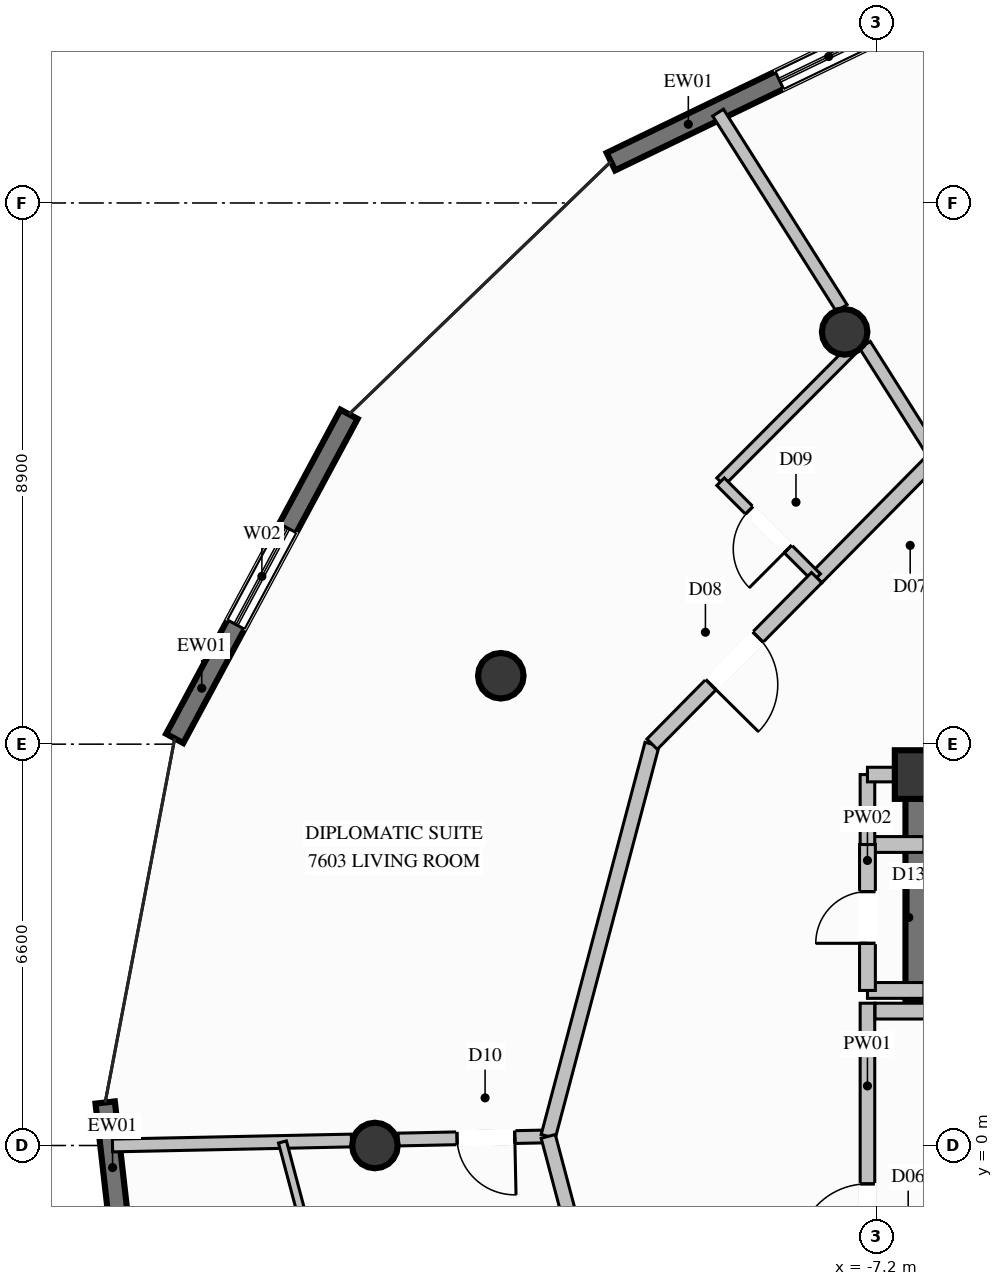
"""IFC4 building model, lengths in metres.
Left out: names, types, materials, properties, quantities, classifications, styles, units other than length and angle.
Written with IfcOpenShell. Run it as: python <this file> out.ifc"""

import sys

from ifc_helpers import new_model, si_unit, direction, frame, frame_2d, origin, origin_2d, place, context, subcontext, project, spatial, rectangle, circle, extrude, element, fill, save


model = new_model("IFC4")
c1 = context("Model", 3, precision=1e-05, world=origin(), true_north=direction((0.0, 1.0)))
c2 = subcontext(c1, "Body", "Model", "MODEL_VIEW")
j1 = project(units=[si_unit("LENGTHUNIT", "METRE"), si_unit("PLANEANGLEUNIT", "RADIAN")], contexts=[c1])
p1 = place(None, origin())
s1 = spatial("IfcSite", under=j1, at=p1, CompositionType="ELEMENT")
p2 = place(p1, origin())
s2 = spatial("IfcBuilding", under=s1, at=p2, CompositionType="ELEMENT")
p3 = place(p2, frame((0.0, 0.0, 285.8)))
s3 = spatial("IfcBuildingStorey", under=s2, at=p3, CompositionType="ELEMENT", Elevation=285.8)
p4 = place(p3, frame((-6.5, 6.1, 0.0), z_axis=(0.0, 0.0, 1.0), x_axis=(1.0, 0.0, 0.0)))
e1 = element("IfcColumn", 1, at=p4, inside=s3, PredefinedType="COLUMN", context=c2, shape_type="SweptSolid", body=[
    extrude(rectangle(XDim=0.8, YDim=0.8, at=origin_2d()), origin(), (0.0, 0.0, 1.0), 3.8),
])
p5 = place(p3, frame((-6.5, 2.35, 0.0), z_axis=(0.0, 0.0, 1.0), x_axis=(0.0, 1.0, 0.0)))
e2 = element("IfcWall", 2, at=p5, inside=s3, PredefinedType="SHEAR", context=c2, shape_type="SweptSolid", body=[
    extrude(rectangle(XDim=3.975, YDim=0.45, at=frame_2d((1.987, 0.0))), origin(), (0.0, 0.0, 1.0), 3.8),
])
for number, where, z_axis, x_axis in (
    (3, (-7.725, 13.38, 0.0), (0.0, 0.0, 1.0), (1.0, 0.0, 0.0)),
    (4, (-13.38, 7.725, 0.0), (0.0, 0.0, 1.0), (1.0, 0.0, 0.0)),
    (5, (-15.45, 0.0, 0.0), (0.0, 0.0, 1.0), (1.0, 0.0, 0.0)),
):
    element("IfcColumn", number, at=place(p3, frame(where, z_axis=z_axis, x_axis=x_axis)), inside=s3, PredefinedType="COLUMN", context=c2, shape_type="SweptSolid", body=[
        extrude(circle(Radius=0.375, at=origin_2d()), origin(), (0.0, 0.0, 1.0), 3.8),
    ])
p6 = place(p3, frame((-11.569, 16.18, 0.0), z_axis=(0.0, 0.0, 1.0), x_axis=(0.900627949964, 0.434590952212, 0.0)))
e6 = element("IfcWall", 6, at=p6, inside=s3, PredefinedType="SOLIDWALL", context=c2, shape_type="SweptSolid", body=[
    extrude(rectangle(XDim=5.916, YDim=0.32, at=frame_2d((2.958, 0.0))), origin(), (0.0, 0.0, 1.0), 3.57),
])
p7 = place(p6, frame((3.077, 0.0, 0.35)))
e7 = element("IfcOpeningElement", 7, at=p7, cuts=e6, PredefinedType="OPENING", context=c2, shape_type="SweptSolid", body=[
    extrude(rectangle(XDim=1.8, YDim=2.6, at=frame_2d((0.9, 1.3))), frame((0.0, 0.17, 0.0), z_axis=(0.0, -1.0, 0.0), x_axis=(1.0, 0.0, 0.0)), (0.0, 0.0, 1.0), 0.34),
])
p8 = place(p3, frame((-18.743, 6.694, 0.0), z_axis=(0.0, 0.0, 1.0), x_axis=(0.473652377816, 0.880711885346, 0.0)))
e8 = element("IfcWall", 8, at=p8, inside=s3, PredefinedType="SOLIDWALL", context=c2, shape_type="SweptSolid", body=[
    extrude(rectangle(XDim=6.053, YDim=0.32, at=frame_2d((3.026, 0.0))), origin(), (0.0, 0.0, 1.0), 3.57),
])
p9 = place(p8, frame((2.127, 0.0, 0.35)))
e9 = element("IfcOpeningElement", 9, at=p9, cuts=e8, PredefinedType="OPENING", context=c2, shape_type="SweptSolid", body=[
    extrude(rectangle(XDim=1.8, YDim=2.6, at=frame_2d((0.9, 1.3))), frame((0.0, 0.17, 0.0), z_axis=(0.0, -1.0, 0.0), x_axis=(1.0, 0.0, 0.0)), (0.0, 0.0, 1.0), 0.34),
])
p10 = place(p3, frame((-19.197, -5.349, 0.0), z_axis=(0.0, 0.0, 1.0), x_axis=(-0.113191877531, 0.993573147212, 0.0)))
e10 = element("IfcWall", 10, at=p10, inside=s3, PredefinedType="SOLIDWALL", context=c2, shape_type="SweptSolid", body=[
    extrude(rectangle(XDim=6.095, YDim=0.32, at=frame_2d((3.048, 0.0))), origin(), (0.0, 0.0, 1.0), 3.57),
])
p11 = place(p10, frame((1.892, 0.0, 0.35)))
e11 = element("IfcOpeningElement", 11, at=p11, cuts=e10, PredefinedType="OPENING", context=c2, shape_type="SweptSolid", body=[
    extrude(rectangle(XDim=1.8, YDim=2.6, at=frame_2d((0.9, 1.3))), frame((0.0, 0.17, 0.0), z_axis=(0.0, -1.0, 0.0), x_axis=(1.0, 0.0, 0.0)), (0.0, 0.0, 1.0), 0.34),
])
p12 = place(p3, frame((-7.35, -3.38, 0.0), z_axis=(0.0, 0.0, 1.0), x_axis=(0.0, 1.0, 0.0)))
e12 = element("IfcWall", 12, at=p12, inside=s3, PredefinedType="PARTITIONING", context=c2, shape_type="SweptSolid", body=[
    extrude(rectangle(XDim=5.72, YDim=0.24, at=frame_2d((2.86, 0.0))), origin(), (0.0, 0.0, 1.0), 2.655),
])
p13 = place(p12, frame((1.599, 0.0, 0.0)))
e13 = element("IfcOpeningElement", 13, at=p13, cuts=e12, PredefinedType="OPENING", context=c2, shape_type="SweptSolid", body=[
    extrude(rectangle(XDim=1.15, YDim=2.2, at=frame_2d((0.575, 1.1))), frame((0.0, 0.13, 0.0), z_axis=(0.0, -1.0, 0.0), x_axis=(1.0, 0.0, 0.0)), (0.0, 0.0, 1.0), 0.26),
])
p14 = place(p3, frame((-7.225, 2.21, 0.0), z_axis=(0.0, 0.0, 1.0), x_axis=(1.0, 0.0, 0.0)))
e14 = element("IfcWall", 14, at=p14, inside=s3, PredefinedType="PARTITIONING", context=c2, shape_type="SweptSolid", body=[
    extrude(rectangle(XDim=0.875, YDim=0.26, at=frame_2d((0.438, 0.0))), origin(), (0.0, 0.0, 1.0), 3.57),
])
for number, where, z_axis, x_axis in (
    (15, (-7.35, 4.95, 0.0), (0.0, 0.0, 1.0), (1.0, 0.0, 0.0)),
    (16, (-7.35, 2.55, 0.0), (0.0, 0.0, 1.0), (1.0, 0.0, 0.0)),
):
    element("IfcWall", number, at=place(p3, frame(where, z_axis=z_axis, x_axis=x_axis)), inside=s3, PredefinedType="PARTITIONING", context=c2, shape_type="SweptSolid", body=[
        extrude(rectangle(XDim=0.93, YDim=0.26, at=frame_2d((0.465, 0.0))), origin(), (0.0, 0.0, 1.0), 3.57),
    ])
p15 = place(p3, frame((-7.35, 2.55, 0.0), z_axis=(0.0, 0.0, 1.0), x_axis=(0.0, 1.0, 0.0)))
e17 = element("IfcWall", 17, at=p15, inside=s3, PredefinedType="PARTITIONING", context=c2, shape_type="SweptSolid", body=[
    extrude(rectangle(XDim=2.4, YDim=0.26, at=frame_2d((1.2, 0.0))), origin(), (0.0, 0.0, 1.0), 2.655),
])
p16 = place(p15, frame((0.775, 0.0, 0.0)))
e18 = element("IfcOpeningElement", 18, at=p16, cuts=e17, PredefinedType="OPENING", context=c2, shape_type="SweptSolid", body=[
    extrude(rectangle(XDim=0.85, YDim=2.05, at=frame_2d((0.425, 1.025))), frame((0.0, 0.14, 0.0), z_axis=(0.0, -1.0, 0.0), x_axis=(1.0, 0.0, 0.0)), (0.0, 0.0, 1.0), 0.28),
])
p17 = place(p3, frame((-7.35, 4.95, 0.0), z_axis=(0.0, 0.0, 1.0), x_axis=(0.0, 1.0, 0.0)))
e19 = element("IfcWall", 19, at=p17, inside=s3, PredefinedType="PARTITIONING", context=c2, shape_type="SweptSolid", body=[
    extrude(rectangle(XDim=1.15, YDim=0.24, at=frame_2d((0.575, 0.0))), origin(), (0.0, 0.0, 1.0), 2.655),
])
p18 = place(p3, frame((-7.35, 6.1, 0.0), z_axis=(0.0, 0.0, 1.0), x_axis=(1.0, 0.0, 0.0)))
e20 = element("IfcWall", 20, at=p18, inside=s3, PredefinedType="PARTITIONING", context=c2, shape_type="SweptSolid", body=[
    extrude(rectangle(XDim=0.85, YDim=0.24, at=frame_2d((0.425, 0.0))), origin(), (0.0, 0.0, 1.0), 3.011),
])
p19 = place(p3, frame((-6.225, 11.322, 0.0), z_axis=(0.0, 0.0, 1.0), x_axis=(-0.534565103323, 0.845127298287, 0.0)))
e21 = element("IfcWall", 21, at=p19, inside=s3, PredefinedType="PARTITIONING", context=c2, shape_type="SweptSolid", body=[
    extrude(rectangle(XDim=2.183, YDim=0.21, at=frame_2d((1.092, 0.0))), origin(), (0.0, 0.0, 1.0), 3.011),
])
p20 = place(p3, frame((-7.774, 13.772, 0.0), z_axis=(0.0, 0.0, 1.0), x_axis=(-0.534555632153, 0.845133288975, 0.0)))
e22 = element("IfcWall", 22, at=p20, inside=s3, PredefinedType="PARTITIONING", context=c2, shape_type="SweptSolid", body=[
    extrude(rectangle(XDim=3.803, YDim=0.21, at=frame_2d((1.901, 0.0))), origin(), (0.0, 0.0, 1.0), 3.57),
])
p21 = place(p3, frame((-12.6, 0.15, 0.0), z_axis=(0.0, 0.0, 1.0), x_axis=(-0.999777874808, -0.021076077527, 0.0)))
e23 = element("IfcWall", 23, at=p21, inside=s3, PredefinedType="PARTITIONING", context=c2, shape_type="SweptSolid", body=[
    extrude(rectangle(XDim=2.467, YDim=0.21, at=frame_2d((1.234, 0.0))), origin(), (0.0, 0.0, 1.0), 3.57),
])
p22 = place(p21, frame((0.55, 0.0, 0.0)))
e24 = element("IfcOpeningElement", 24, at=p22, cuts=e23, PredefinedType="OPENING", context=c2, shape_type="SweptSolid", body=[
    extrude(rectangle(XDim=0.95, YDim=2.1, at=frame_2d((0.475, 1.05))), frame((0.0, 0.115, 0.0), z_axis=(0.0, -1.0, 0.0), x_axis=(1.0, 0.0, 0.0)), (0.0, 0.0, 1.0), 0.23),
])
p23 = place(p3, frame((-15.836, 0.082, 0.0), z_axis=(0.0, 0.0, 1.0), x_axis=(-0.999782247654, -0.020867613071, 0.0)))
e25 = element("IfcWall", 25, at=p23, inside=s3, PredefinedType="PARTITIONING", context=c2, shape_type="SweptSolid", body=[
    extrude(rectangle(XDim=3.931, YDim=0.21, at=frame_2d((1.966, 0.0))), origin(), (0.0, 0.0, 1.0), 3.57),
])
p24 = place(p3, frame((-6.225, 11.322, 0.0), z_axis=(0.0, 0.0, 1.0), x_axis=(-0.702979205765, -0.711210402245, 0.0)))
e26 = element("IfcWall", 26, at=p24, inside=s3, PredefinedType="PARTITIONING", context=c2, shape_type="SweptSolid", body=[
    extrude(rectangle(XDim=2.788, YDim=0.24, at=frame_2d((1.394, 0.0))), origin(), (0.0, 0.0, 1.0), 3.57),
])
p25 = place(p3, frame((-7.443, 13.248, 0.0), z_axis=(0.0, 0.0, 1.0), x_axis=(-0.705733293668, -0.708477606003, 0.0)))
e27 = element("IfcWall", 27, at=p25, inside=s3, PredefinedType="PLUMBINGWALL", context=c2, shape_type="SweptSolid", body=[
    extrude(rectangle(XDim=3.292, YDim=0.175, at=frame_2d((1.646, 0.0))), origin(), (0.0, 0.0, 1.0), 3.137),
])
p26 = place(p3, frame((-8.185, 9.339, 0.0), z_axis=(0.0, 0.0, 1.0), x_axis=(-0.708035494418, 0.706176846579, 0.0)))
e28 = element("IfcWall", 28, at=p26, inside=s3, PredefinedType="PLUMBINGWALL", context=c2, shape_type="SweptSolid", body=[
    extrude(rectangle(XDim=2.233, YDim=0.175, at=frame_2d((1.116, 0.0))), origin(), (0.0, 0.0, 1.0), 3.57),
])
p27 = place(p26, frame((0.667, 0.0, 0.0)))
e29 = element("IfcOpeningElement", 29, at=p27, cuts=e28, PredefinedType="OPENING", context=c2, shape_type="SweptSolid", body=[
    extrude(rectangle(XDim=0.9, YDim=2.1, at=frame_2d((0.45, 1.05))), frame((0.0, 0.098, 0.0), z_axis=(0.0, -1.0, 0.0), x_axis=(1.0, 0.0, 0.0)), (0.0, 0.0, 1.0), 0.195),
])
p28 = place(p3, frame((-10.892, 6.6, 0.0), z_axis=(0.0, 0.0, 1.0), x_axis=(-0.255977036578, -0.966682862548, 0.0)))
e30 = element("IfcWall", 30, at=p28, inside=s3, PredefinedType="PARTITIONING", context=c2, shape_type="SweptSolid", body=[
    extrude(rectangle(XDim=6.673, YDim=0.24, at=frame_2d((3.336, 0.0))), origin(), (0.0, 0.0, 1.0), 3.57),
])
p29 = place(p3, frame((-8.185, 9.339, 0.0), z_axis=(0.0, 0.0, 1.0), x_axis=(-0.702942107486, -0.711247069254, 0.0)))
e31 = element("IfcWall", 31, at=p29, inside=s3, PredefinedType="PARTITIONING", context=c2, shape_type="SweptSolid", body=[
    extrude(rectangle(XDim=3.851, YDim=0.24, at=frame_2d((1.926, 0.0))), origin(), (0.0, 0.0, 1.0), 3.57),
])
p30 = place(p29, frame((1.375, 0.0, 0.0)))
e32 = element("IfcOpeningElement", 32, at=p30, cuts=e31, PredefinedType="OPENING", context=c2, shape_type="SweptSolid", body=[
    extrude(rectangle(XDim=1.1, YDim=2.3, at=frame_2d((0.55, 1.15))), frame((0.0, 0.13, 0.0), z_axis=(0.0, -1.0, 0.0), x_axis=(1.0, 0.0, 0.0)), (0.0, 0.0, 1.0), 0.26),
])
p31 = place(p3, frame((-12.6, 0.15, 0.0), z_axis=(0.0, 0.0, 1.0), x_axis=(0.255986090798, -0.966680464951, 0.0)))
e33 = element("IfcWall", 33, at=p31, inside=s3, PredefinedType="PARTITIONING", context=c2, shape_type="SweptSolid", body=[
    extrude(rectangle(XDim=6.672, YDim=0.24, at=frame_2d((3.336, 0.0))), origin(), (0.0, 0.0, 1.0), 3.57),
])
p32 = place(p3, frame((-16.971, 0.058, 0.0), z_axis=(0.0, 0.0, 1.0), x_axis=(0.2566078117, -0.966515613415, 0.0)))
e34 = element("IfcWall", 34, at=p32, inside=s3, PredefinedType="PARTITIONING", context=c2, shape_type="SweptSolid", body=[
    extrude(rectangle(XDim=8.846, YDim=0.135, at=frame_2d((4.423, 0.0))), origin(), (0.0, 0.0, 1.0), 3.57),
])
p33 = place(p32, frame((3.948, 0.0, 0.0)))
e35 = element("IfcOpeningElement", 35, at=p33, cuts=e34, PredefinedType="OPENING", context=c2, shape_type="SweptSolid", body=[
    extrude(rectangle(XDim=0.95, YDim=2.1, at=frame_2d((0.475, 1.05))), frame((0.0, 0.078, 0.0), z_axis=(0.0, -1.0, 0.0), x_axis=(1.0, 0.0, 0.0)), (0.0, 0.0, 1.0), 0.155),
])
p34 = place(p7, origin())
e36 = element("IfcWindow", 36, at=p34, inside=s3, PartitioningType="SINGLE_PANEL", PredefinedType="WINDOW", context=c2, shape_type="SweptSolid", body=[
    extrude(rectangle(XDim=1.8, YDim=2.6, at=frame_2d((0.9, 1.3))), frame((0.0, 0.03, 0.0), z_axis=(0.0, -1.0, 0.0), x_axis=(1.0, 0.0, 0.0)), (0.0, 0.0, 1.0), 0.06),
])
fill(e7, e36)
p35 = place(p9, origin())
e37 = element("IfcWindow", 37, at=p35, inside=s3, PartitioningType="SINGLE_PANEL", PredefinedType="WINDOW", context=c2, shape_type="SweptSolid", body=[
    extrude(rectangle(XDim=1.8, YDim=2.6, at=frame_2d((0.9, 1.3))), frame((0.0, 0.03, 0.0), z_axis=(0.0, -1.0, 0.0), x_axis=(1.0, 0.0, 0.0)), (0.0, 0.0, 1.0), 0.06),
])
fill(e9, e37)
p36 = place(p13, origin())
e38 = element("IfcDoor", 38, at=p36, inside=s3, OperationType="SINGLE_SWING_LEFT", PredefinedType="DOOR", context=c2, shape_type="SweptSolid", body=[
    extrude(rectangle(XDim=1.15, YDim=2.2, at=frame_2d((0.575, 1.1))), frame((0.0, 0.025, 0.0), z_axis=(0.0, -1.0, 0.0), x_axis=(1.0, 0.0, 0.0)), (0.0, 0.0, 1.0), 0.05),
])
fill(e13, e38)
p37 = place(p16, origin())
e39 = element("IfcDoor", 39, at=p37, inside=s3, OperationType="SINGLE_SWING_LEFT", PredefinedType="DOOR", context=c2, shape_type="SweptSolid", body=[
    extrude(rectangle(XDim=0.85, YDim=2.05, at=frame_2d((0.425, 1.025))), frame((0.0, 0.025, 0.0), z_axis=(0.0, -1.0, 0.0), x_axis=(1.0, 0.0, 0.0)), (0.0, 0.0, 1.0), 0.05),
])
fill(e18, e39)
p38 = place(p27, origin())
e40 = element("IfcDoor", 40, at=p38, inside=s3, OperationType="SINGLE_SWING_LEFT", PredefinedType="DOOR", context=c2, shape_type="SweptSolid", body=[
    extrude(rectangle(XDim=0.9, YDim=2.1, at=frame_2d((0.45, 1.05))), frame((0.0, 0.025, 0.0), z_axis=(0.0, -1.0, 0.0), x_axis=(1.0, 0.0, 0.0)), (0.0, 0.0, 1.0), 0.05),
])
fill(e29, e40)
p39 = place(p30, origin())
e41 = element("IfcDoor", 41, at=p39, inside=s3, OperationType="SINGLE_SWING_RIGHT", PredefinedType="DOOR", context=c2, shape_type="SweptSolid", body=[
    extrude(rectangle(XDim=1.1, YDim=2.3, at=frame_2d((0.55, 1.15))), frame((0.0, 0.025, 0.0), z_axis=(0.0, -1.0, 0.0), x_axis=(1.0, 0.0, 0.0)), (0.0, 0.0, 1.0), 0.05),
])
fill(e32, e41)
p40 = place(p22, origin())
e42 = element("IfcDoor", 42, at=p40, inside=s3, OperationType="SINGLE_SWING_LEFT", PredefinedType="DOOR", context=c2, shape_type="SweptSolid", body=[
    extrude(rectangle(XDim=0.95, YDim=2.1, at=frame_2d((0.475, 1.05))), frame((0.0, 0.025, 0.0), z_axis=(0.0, -1.0, 0.0), x_axis=(1.0, 0.0, 0.0)), (0.0, 0.0, 1.0), 0.05),
])
fill(e24, e42)
save(model, sys.argv[1])
